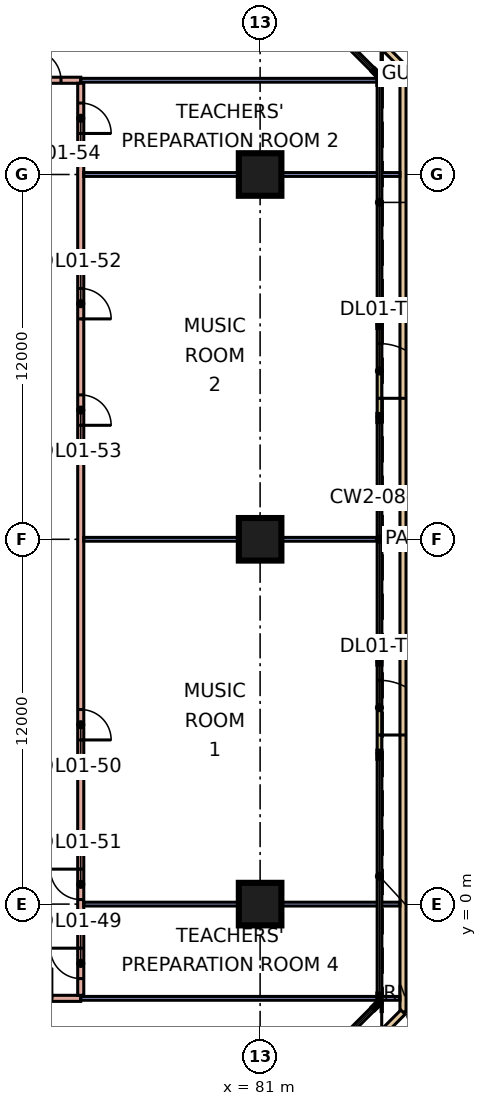
"""IFC4 building model, lengths in metres.
Left out: names, types, materials, properties, quantities, classifications, styles, units other than length and angle.
Written with IfcOpenShell. Run it as: python <this file> out.ifc"""

import sys

from ifc_helpers import new_model, si_unit, direction, frame, frame_2d, origin, origin_2d, place, context, subcontext, project, spatial, rectangle, extrude, element, fill, save


model = new_model("IFC4")
c1 = context("Model", 3, precision=1e-05, world=origin(), true_north=direction((0.0, 1.0)))
c2 = subcontext(c1, "Body", "Model", "MODEL_VIEW")
j1 = project(units=[si_unit("LENGTHUNIT", "METRE"), si_unit("PLANEANGLEUNIT", "RADIAN")], contexts=[c1])
p1 = place(None, origin())
s1 = spatial("IfcSite", under=j1, at=p1, CompositionType="ELEMENT")
p2 = place(p1, origin())
s2 = spatial("IfcBuilding", under=s1, at=p2, CompositionType="ELEMENT")
p3 = place(p2, frame((0.0, 0.0, 7.2)))
s3 = spatial("IfcBuildingStorey", under=s2, at=p3, CompositionType="ELEMENT", Elevation=7.2)
for number, where, z_axis, x_axis in (
    (1, (81.0, 0.0, 0.0), (0.0, 0.0, 1.0), (1.0, 0.0, 0.0)),
    (2, (81.0, 12.0, 0.0), (0.0, 0.0, 1.0), (1.0, 0.0, 0.0)),
    (3, (81.0, 24.0, 0.0), (0.0, 0.0, 1.0), (1.0, 0.0, 0.0)),
):
    element("IfcColumn", number, at=place(p3, frame(where, z_axis=z_axis, x_axis=x_axis)), inside=s3, PredefinedType="COLUMN", context=c2, shape_type="SweptSolid", body=[
        extrude(rectangle(XDim=1.4, YDim=1.4, at=origin_2d()), origin(), (0.0, 0.0, 1.0), 4.8),
    ])
p4 = place(p3, frame((84.925, 4.962, 0.0), z_axis=(0.0, 0.0, 1.0), x_axis=(0.0, 1.0, 0.0)))
e4 = element("IfcWall", 4, at=p4, inside=s3, PredefinedType="SOLIDWALL", context=c2, shape_type="SweptSolid", body=[
    extrude(rectangle(XDim=3.0, YDim=0.15, at=frame_2d((1.5, 0.0))), origin(), (0.0, 0.0, 1.0), 4.4),
])
p5 = place(p4, frame((0.6, 0.0, 0.0)))
e5 = element("IfcOpeningElement", 5, at=p5, cuts=e4, PredefinedType="OPENING", context=c2, shape_type="SweptSolid", body=[
    extrude(rectangle(XDim=1.8, YDim=2.4, at=frame_2d((0.9, 1.2))), frame((0.0, 0.085, 0.0), z_axis=(0.0, -1.0, 0.0), x_axis=(1.0, 0.0, 0.0)), (0.0, 0.0, 1.0), 0.17),
])
p6 = place(p3, frame((84.925, 16.038, 0.0), z_axis=(0.0, 0.0, 1.0), x_axis=(0.0, 1.0, 0.0)))
e6 = element("IfcWall", 6, at=p6, inside=s3, PredefinedType="SOLIDWALL", context=c2, shape_type="SweptSolid", body=[
    extrude(rectangle(XDim=3.0, YDim=0.15, at=frame_2d((1.5, 0.0))), origin(), (0.0, 0.0, 1.0), 4.4),
])
p7 = place(p6, frame((0.6, 0.0, 0.0)))
e7 = element("IfcOpeningElement", 7, at=p7, cuts=e6, PredefinedType="OPENING", context=c2, shape_type="SweptSolid", body=[
    extrude(rectangle(XDim=1.8, YDim=2.4, at=frame_2d((0.9, 1.2))), frame((0.0, 0.085, 0.0), z_axis=(0.0, -1.0, 0.0), x_axis=(1.0, 0.0, 0.0)), (0.0, 0.0, 1.0), 0.17),
])
p8 = place(p3, frame((75.553, 37.7, 0.0), z_axis=(0.0, 0.0, 1.0), x_axis=(0.707106781187, -0.707106781187, 0.0)))
e8 = element("IfcWall", 8, at=p8, inside=s3, PredefinedType="PARAPET", context=c2, shape_type="SweptSolid", body=[
    extrude(rectangle(XDim=14.349, YDim=0.2, at=frame_2d((7.175, 0.0))), origin(), (0.0, 0.0, 1.0), 0.5),
])
p9 = place(p3, frame((85.7, 27.553, 0.0), z_axis=(0.0, 0.0, 1.0), x_axis=(0.0, -1.0, 0.0)))
e9 = element("IfcWall", 9, at=p9, inside=s3, PredefinedType="PARAPET", context=c2, shape_type="SweptSolid", body=[
    extrude(rectangle(XDim=31.107, YDim=0.2, at=frame_2d((15.553, 0.0))), origin(), (0.0, 0.0, 1.0), 0.5),
])
p10 = place(p3, frame((85.7, -3.553, 0.0), z_axis=(0.0, 0.0, 1.0), x_axis=(-0.707106781187, -0.707106781187, 0.0)))
e10 = element("IfcWall", 10, at=p10, inside=s3, PredefinedType="PARAPET", context=c2, shape_type="SweptSolid", body=[
    extrude(rectangle(XDim=14.349, YDim=0.2, at=frame_2d((7.175, 0.0))), origin(), (0.0, 0.0, 1.0), 0.5),
])
p11 = place(p3, frame((-1.953, -3.1, 0.0), z_axis=(0.0, 0.0, 1.0), x_axis=(1.0, 0.0, 0.0)))
e11 = element("IfcWall", 11, at=p11, inside=s3, PredefinedType="PARTITIONING", context=c2, shape_type="SweptSolid", body=[
    extrude(rectangle(XDim=77.053, YDim=0.2, at=frame_2d((38.526, 0.0))), origin(), (0.0, 0.0, 1.0), 4.4),
])
p12 = place(p11, frame((7.353, 0.0, 0.0)))
e12 = element("IfcOpeningElement", 12, at=p12, cuts=e11, PredefinedType="OPENING", context=c2, shape_type="SweptSolid", body=[
    extrude(rectangle(XDim=1.0, YDim=2.1, at=frame_2d((0.5, 1.05))), frame((0.0, 0.11, 0.0), z_axis=(0.0, -1.0, 0.0), x_axis=(1.0, 0.0, 0.0)), (0.0, 0.0, 1.0), 0.22),
])
p13 = place(p11, frame((19.353, 0.0, 0.0)))
e13 = element("IfcOpeningElement", 13, at=p13, cuts=e11, PredefinedType="OPENING", context=c2, shape_type="SweptSolid", body=[
    extrude(rectangle(XDim=1.0, YDim=2.1, at=frame_2d((0.5, 1.05))), frame((0.0, 0.11, 0.0), z_axis=(0.0, -1.0, 0.0), x_axis=(1.0, 0.0, 0.0)), (0.0, 0.0, 1.0), 0.22),
])
p14 = place(p11, frame((14.103, 0.0, 0.0)))
e14 = element("IfcOpeningElement", 14, at=p14, cuts=e11, PredefinedType="OPENING", context=c2, shape_type="SweptSolid", body=[
    extrude(rectangle(XDim=1.0, YDim=2.1, at=frame_2d((0.5, 1.05))), frame((0.0, 0.11, 0.0), z_axis=(0.0, -1.0, 0.0), x_axis=(1.0, 0.0, 0.0)), (0.0, 0.0, 1.0), 0.22),
])
p15 = place(p11, frame((31.353, 0.0, 0.0)))
e15 = element("IfcOpeningElement", 15, at=p15, cuts=e11, PredefinedType="OPENING", context=c2, shape_type="SweptSolid", body=[
    extrude(rectangle(XDim=1.0, YDim=2.1, at=frame_2d((0.5, 1.05))), frame((0.0, 0.11, 0.0), z_axis=(0.0, -1.0, 0.0), x_axis=(1.0, 0.0, 0.0)), (0.0, 0.0, 1.0), 0.22),
])
p16 = place(p11, frame((26.103, 0.0, 0.0)))
e16 = element("IfcOpeningElement", 16, at=p16, cuts=e11, PredefinedType="OPENING", context=c2, shape_type="SweptSolid", body=[
    extrude(rectangle(XDim=1.0, YDim=2.1, at=frame_2d((0.5, 1.05))), frame((0.0, 0.11, 0.0), z_axis=(0.0, -1.0, 0.0), x_axis=(1.0, 0.0, 0.0)), (0.0, 0.0, 1.0), 0.22),
])
p17 = place(p11, frame((41.853, 0.0, 0.0)))
e17 = element("IfcOpeningElement", 17, at=p17, cuts=e11, PredefinedType="OPENING", context=c2, shape_type="SweptSolid", body=[
    extrude(rectangle(XDim=1.0, YDim=2.1, at=frame_2d((0.5, 1.05))), frame((0.0, 0.11, 0.0), z_axis=(0.0, -1.0, 0.0), x_axis=(1.0, 0.0, 0.0)), (0.0, 0.0, 1.0), 0.22),
])
p18 = place(p11, frame((50.853, 0.0, 0.0)))
e18 = element("IfcOpeningElement", 18, at=p18, cuts=e11, PredefinedType="OPENING", context=c2, shape_type="SweptSolid", body=[
    extrude(rectangle(XDim=1.0, YDim=2.1, at=frame_2d((0.5, 1.05))), frame((0.0, 0.11, 0.0), z_axis=(0.0, -1.0, 0.0), x_axis=(1.0, 0.0, 0.0)), (0.0, 0.0, 1.0), 0.22),
])
p19 = place(p11, frame((59.853, 0.0, 0.0)))
e19 = element("IfcOpeningElement", 19, at=p19, cuts=e11, PredefinedType="OPENING", context=c2, shape_type="SweptSolid", body=[
    extrude(rectangle(XDim=1.0, YDim=2.1, at=frame_2d((0.5, 1.05))), frame((0.0, 0.11, 0.0), z_axis=(0.0, -1.0, 0.0), x_axis=(1.0, 0.0, 0.0)), (0.0, 0.0, 1.0), 0.22),
])
p20 = place(p11, frame((68.853, 0.0, 0.0)))
e20 = element("IfcOpeningElement", 20, at=p20, cuts=e11, PredefinedType="OPENING", context=c2, shape_type="SweptSolid", body=[
    extrude(rectangle(XDim=1.0, YDim=2.1, at=frame_2d((0.5, 1.05))), frame((0.0, 0.11, 0.0), z_axis=(0.0, -1.0, 0.0), x_axis=(1.0, 0.0, 0.0)), (0.0, 0.0, 1.0), 0.22),
])
p21 = place(p11, frame((75.103, 0.0, 0.0)))
e21 = element("IfcOpeningElement", 21, at=p21, cuts=e11, PredefinedType="OPENING", context=c2, shape_type="SweptSolid", body=[
    extrude(rectangle(XDim=1.0, YDim=2.1, at=frame_2d((0.5, 1.05))), frame((0.0, 0.11, 0.0), z_axis=(0.0, -1.0, 0.0), x_axis=(1.0, 0.0, 0.0)), (0.0, 0.0, 1.0), 0.22),
])
p22 = place(p3, frame((38.3, 27.1, 0.0), z_axis=(0.0, 0.0, 1.0), x_axis=(1.0, 0.0, 0.0)))
e22 = element("IfcWall", 22, at=p22, inside=s3, PredefinedType="PARTITIONING", context=c2, shape_type="SweptSolid", body=[
    extrude(rectangle(XDim=36.8, YDim=0.2, at=frame_2d((18.4, 0.0))), origin(), (0.0, 0.0, 1.0), 4.4),
])
p23 = place(p22, frame((10.8, 0.0, 0.0)))
e23 = element("IfcOpeningElement", 23, at=p23, cuts=e22, PredefinedType="OPENING", context=c2, shape_type="SweptSolid", body=[
    extrude(rectangle(XDim=1.0, YDim=2.1, at=frame_2d((0.5, 1.05))), frame((0.0, 0.11, 0.0), z_axis=(0.0, -1.0, 0.0), x_axis=(1.0, 0.0, 0.0)), (0.0, 0.0, 1.0), 0.22),
])
p24 = place(p22, frame((19.8, 0.0, 0.0)))
e24 = element("IfcOpeningElement", 24, at=p24, cuts=e22, PredefinedType="OPENING", context=c2, shape_type="SweptSolid", body=[
    extrude(rectangle(XDim=1.0, YDim=2.1, at=frame_2d((0.5, 1.05))), frame((0.0, 0.11, 0.0), z_axis=(0.0, -1.0, 0.0), x_axis=(1.0, 0.0, 0.0)), (0.0, 0.0, 1.0), 0.22),
])
p25 = place(p22, frame((28.8, 0.0, 0.0)))
e25 = element("IfcOpeningElement", 25, at=p25, cuts=e22, PredefinedType="OPENING", context=c2, shape_type="SweptSolid", body=[
    extrude(rectangle(XDim=1.0, YDim=2.1, at=frame_2d((0.5, 1.05))), frame((0.0, 0.11, 0.0), z_axis=(0.0, -1.0, 0.0), x_axis=(1.0, 0.0, 0.0)), (0.0, 0.0, 1.0), 0.22),
])
p26 = place(p22, frame((35.15, 0.0, 0.0)))
e26 = element("IfcOpeningElement", 26, at=p26, cuts=e22, PredefinedType="OPENING", context=c2, shape_type="SweptSolid", body=[
    extrude(rectangle(XDim=1.0, YDim=2.1, at=frame_2d((0.5, 1.05))), frame((0.0, 0.11, 0.0), z_axis=(0.0, -1.0, 0.0), x_axis=(1.0, 0.0, 0.0)), (0.0, 0.0, 1.0), 0.22),
])
p27 = place(p3, frame((54.0, -0.7, 0.0), z_axis=(0.0, 0.0, 1.0), x_axis=(1.0, 0.0, 0.0)))
e27 = element("IfcWall", 27, at=p27, inside=s3, PredefinedType="PARTITIONING", context=c2, shape_type="SweptSolid", body=[
    extrude(rectangle(XDim=21.0, YDim=0.2, at=frame_2d((10.5, 0.0))), origin(), (0.0, 0.0, 1.0), 4.4),
])
p28 = place(p27, frame((4.1, 0.0, 0.0)))
e28 = element("IfcOpeningElement", 28, at=p28, cuts=e27, PredefinedType="OPENING", context=c2, shape_type="SweptSolid", body=[
    extrude(rectangle(XDim=1.0, YDim=2.1, at=frame_2d((0.5, 1.05))), frame((0.0, 0.11, 0.0), z_axis=(0.0, -1.0, 0.0), x_axis=(1.0, 0.0, 0.0)), (0.0, 0.0, 1.0), 0.22),
])
p29 = place(p3, frame((75.1, -3.1, 0.0), z_axis=(0.0, 0.0, 1.0), x_axis=(1.0, 0.0, 0.0)))
e29 = element("IfcWall", 29, at=p29, inside=s3, PredefinedType="PARTITIONING", context=c2, shape_type="SweptSolid", body=[
    extrude(rectangle(XDim=10.5, YDim=0.125, at=frame_2d((5.25, 0.0))), origin(), (0.0, 0.0, 1.0), 4.4),
])
p30 = place(p3, frame((75.1, -3.0, 0.0), z_axis=(0.0, 0.0, 1.0), x_axis=(0.0, 1.0, 0.0)))
e30 = element("IfcWall", 30, at=p30, inside=s3, PredefinedType="PARTITIONING", context=c2, shape_type="SweptSolid", body=[
    extrude(rectangle(XDim=30.0, YDim=0.2, at=frame_2d((15.0, 0.0))), origin(), (0.0, 0.0, 1.0), 4.4),
])
p31 = place(p30, frame((0.55, 0.0, 0.0)))
e31 = element("IfcOpeningElement", 31, at=p31, cuts=e30, PredefinedType="OPENING", context=c2, shape_type="SweptSolid", body=[
    extrude(rectangle(XDim=1.0, YDim=2.1, at=frame_2d((0.5, 1.05))), frame((0.0, 0.11, 0.0), z_axis=(0.0, -1.0, 0.0), x_axis=(1.0, 0.0, 0.0)), (0.0, 0.0, 1.0), 0.22),
])
p32 = place(p30, frame((8.4, 0.0, 0.0)))
e32 = element("IfcOpeningElement", 32, at=p32, cuts=e30, PredefinedType="OPENING", context=c2, shape_type="SweptSolid", body=[
    extrude(rectangle(XDim=1.0, YDim=2.1, at=frame_2d((0.5, 1.05))), frame((0.0, 0.11, 0.0), z_axis=(0.0, -1.0, 0.0), x_axis=(1.0, 0.0, 0.0)), (0.0, 0.0, 1.0), 0.22),
])
p33 = place(p30, frame((3.15, 0.0, 0.0)))
e33 = element("IfcOpeningElement", 33, at=p33, cuts=e30, PredefinedType="OPENING", context=c2, shape_type="SweptSolid", body=[
    extrude(rectangle(XDim=1.0, YDim=2.1, at=frame_2d((0.5, 1.05))), frame((0.0, 0.11, 0.0), z_axis=(0.0, -1.0, 0.0), x_axis=(1.0, 0.0, 0.0)), (0.0, 0.0, 1.0), 0.22),
])
p34 = place(p30, frame((22.25, 0.0, 0.0)))
e34 = element("IfcOpeningElement", 34, at=p34, cuts=e30, PredefinedType="OPENING", context=c2, shape_type="SweptSolid", body=[
    extrude(rectangle(XDim=1.0, YDim=2.1, at=frame_2d((0.5, 1.05))), frame((0.0, 0.11, 0.0), z_axis=(0.0, -1.0, 0.0), x_axis=(1.0, 0.0, 0.0)), (0.0, 0.0, 1.0), 0.22),
])
p35 = place(p30, frame((18.75, 0.0, 0.0)))
e35 = element("IfcOpeningElement", 35, at=p35, cuts=e30, PredefinedType="OPENING", context=c2, shape_type="SweptSolid", body=[
    extrude(rectangle(XDim=1.0, YDim=2.1, at=frame_2d((0.5, 1.05))), frame((0.0, 0.11, 0.0), z_axis=(0.0, -1.0, 0.0), x_axis=(1.0, 0.0, 0.0)), (0.0, 0.0, 1.0), 0.22),
])
p36 = place(p30, frame((28.35, 0.0, 0.0)))
e36 = element("IfcOpeningElement", 36, at=p36, cuts=e30, PredefinedType="OPENING", context=c2, shape_type="SweptSolid", body=[
    extrude(rectangle(XDim=1.0, YDim=2.1, at=frame_2d((0.5, 1.05))), frame((0.0, 0.11, 0.0), z_axis=(0.0, -1.0, 0.0), x_axis=(1.0, 0.0, 0.0)), (0.0, 0.0, 1.0), 0.22),
])
p37 = place(p3, frame((75.1, 27.1, 0.0), z_axis=(0.0, 0.0, 1.0), x_axis=(1.0, 0.0, 0.0)))
e37 = element("IfcWall", 37, at=p37, inside=s3, PredefinedType="PARTITIONING", context=c2, shape_type="SweptSolid", body=[
    extrude(rectangle(XDim=10.5, YDim=0.125, at=frame_2d((5.25, 0.0))), origin(), (0.0, 0.0, 1.0), 4.4),
])
for number, where, z_axis, x_axis in (
    (38, (75.2, 0.0, 0.0), (0.0, 0.0, 1.0), (1.0, 0.0, 0.0)),
    (39, (75.2, 12.0, 0.0), (0.0, 0.0, 1.0), (1.0, 0.0, 0.0)),
    (40, (75.2, 24.0, 0.0), (0.0, 0.0, 1.0), (1.0, 0.0, 0.0)),
):
    element("IfcWall", number, at=place(p3, frame(where, z_axis=z_axis, x_axis=x_axis)), inside=s3, PredefinedType="PARTITIONING", context=c2, shape_type="SweptSolid", body=[
        extrude(rectangle(XDim=10.4, YDim=0.125, at=frame_2d((5.2, 0.0))), origin(), (0.0, 0.0, 1.0), 4.4),
    ])
p38 = place(p5, frame((1.8, 0.0, 0.0), z_axis=(0.0, 0.0, 1.0), x_axis=(-1.0, 0.0, 0.0)))
e41 = element("IfcDoor", 41, at=p38, inside=s3, OperationType="DOUBLE_DOOR_SINGLE_SWING", PredefinedType="DOOR", context=c2, shape_type="SweptSolid", body=[
    extrude(rectangle(XDim=1.8, YDim=2.4, at=frame_2d((0.9, 1.2))), frame((0.0, 0.025, 0.0), z_axis=(0.0, -1.0, 0.0), x_axis=(1.0, 0.0, 0.0)), (0.0, 0.0, 1.0), 0.05),
])
fill(e5, e41)
p39 = place(p7, frame((1.8, 0.0, 0.0), z_axis=(0.0, 0.0, 1.0), x_axis=(-1.0, 0.0, 0.0)))
e42 = element("IfcDoor", 42, at=p39, inside=s3, OperationType="DOUBLE_DOOR_SINGLE_SWING", PredefinedType="DOOR", context=c2, shape_type="SweptSolid", body=[
    extrude(rectangle(XDim=1.8, YDim=2.4, at=frame_2d((0.9, 1.2))), frame((0.0, 0.025, 0.0), z_axis=(0.0, -1.0, 0.0), x_axis=(1.0, 0.0, 0.0)), (0.0, 0.0, 1.0), 0.05),
])
fill(e7, e42)
p40 = place(p26, origin())
e43 = element("IfcDoor", 43, at=p40, inside=s3, OperationType="SINGLE_SWING_LEFT", PredefinedType="DOOR", context=c2, shape_type="SweptSolid", body=[
    extrude(rectangle(XDim=1.0, YDim=2.1, at=frame_2d((0.5, 1.05))), frame((0.0, 0.025, 0.0), z_axis=(0.0, -1.0, 0.0), x_axis=(1.0, 0.0, 0.0)), (0.0, 0.0, 1.0), 0.05),
])
fill(e26, e43)
p41 = place(p31, frame((1.0, 0.0, 0.0), z_axis=(0.0, 0.0, 1.0), x_axis=(-1.0, 0.0, 0.0)))
e44 = element("IfcDoor", 44, at=p41, inside=s3, OperationType="SINGLE_SWING_RIGHT", PredefinedType="DOOR", context=c2, shape_type="SweptSolid", body=[
    extrude(rectangle(XDim=1.0, YDim=2.1, at=frame_2d((0.5, 1.05))), frame((0.0, 0.025, 0.0), z_axis=(0.0, -1.0, 0.0), x_axis=(1.0, 0.0, 0.0)), (0.0, 0.0, 1.0), 0.05),
])
fill(e31, e44)
p42 = place(p32, frame((1.0, 0.0, 0.0), z_axis=(0.0, 0.0, 1.0), x_axis=(-1.0, 0.0, 0.0)))
e45 = element("IfcDoor", 45, at=p42, inside=s3, OperationType="SINGLE_SWING_LEFT", PredefinedType="DOOR", context=c2, shape_type="SweptSolid", body=[
    extrude(rectangle(XDim=1.0, YDim=2.1, at=frame_2d((0.5, 1.05))), frame((0.0, 0.025, 0.0), z_axis=(0.0, -1.0, 0.0), x_axis=(1.0, 0.0, 0.0)), (0.0, 0.0, 1.0), 0.05),
])
fill(e32, e45)
p43 = place(p33, frame((1.0, 0.0, 0.0), z_axis=(0.0, 0.0, 1.0), x_axis=(-1.0, 0.0, 0.0)))
e46 = element("IfcDoor", 46, at=p43, inside=s3, OperationType="SINGLE_SWING_RIGHT", PredefinedType="DOOR", context=c2, shape_type="SweptSolid", body=[
    extrude(rectangle(XDim=1.0, YDim=2.1, at=frame_2d((0.5, 1.05))), frame((0.0, 0.025, 0.0), z_axis=(0.0, -1.0, 0.0), x_axis=(1.0, 0.0, 0.0)), (0.0, 0.0, 1.0), 0.05),
])
fill(e33, e46)
p44 = place(p34, frame((1.0, 0.0, 0.0), z_axis=(0.0, 0.0, 1.0), x_axis=(-1.0, 0.0, 0.0)))
e47 = element("IfcDoor", 47, at=p44, inside=s3, OperationType="SINGLE_SWING_LEFT", PredefinedType="DOOR", context=c2, shape_type="SweptSolid", body=[
    extrude(rectangle(XDim=1.0, YDim=2.1, at=frame_2d((0.5, 1.05))), frame((0.0, 0.025, 0.0), z_axis=(0.0, -1.0, 0.0), x_axis=(1.0, 0.0, 0.0)), (0.0, 0.0, 1.0), 0.05),
])
fill(e34, e47)
p45 = place(p35, frame((1.0, 0.0, 0.0), z_axis=(0.0, 0.0, 1.0), x_axis=(-1.0, 0.0, 0.0)))
e48 = element("IfcDoor", 48, at=p45, inside=s3, OperationType="SINGLE_SWING_LEFT", PredefinedType="DOOR", context=c2, shape_type="SweptSolid", body=[
    extrude(rectangle(XDim=1.0, YDim=2.1, at=frame_2d((0.5, 1.05))), frame((0.0, 0.025, 0.0), z_axis=(0.0, -1.0, 0.0), x_axis=(1.0, 0.0, 0.0)), (0.0, 0.0, 1.0), 0.05),
])
fill(e35, e48)
p46 = place(p36, frame((1.0, 0.0, 0.0), z_axis=(0.0, 0.0, 1.0), x_axis=(-1.0, 0.0, 0.0)))
e49 = element("IfcDoor", 49, at=p46, inside=s3, OperationType="SINGLE_SWING_LEFT", PredefinedType="DOOR", context=c2, shape_type="SweptSolid", body=[
    extrude(rectangle(XDim=1.0, YDim=2.1, at=frame_2d((0.5, 1.05))), frame((0.0, 0.025, 0.0), z_axis=(0.0, -1.0, 0.0), x_axis=(1.0, 0.0, 0.0)), (0.0, 0.0, 1.0), 0.05),
])
fill(e36, e49)
save(model, sys.argv[1])
